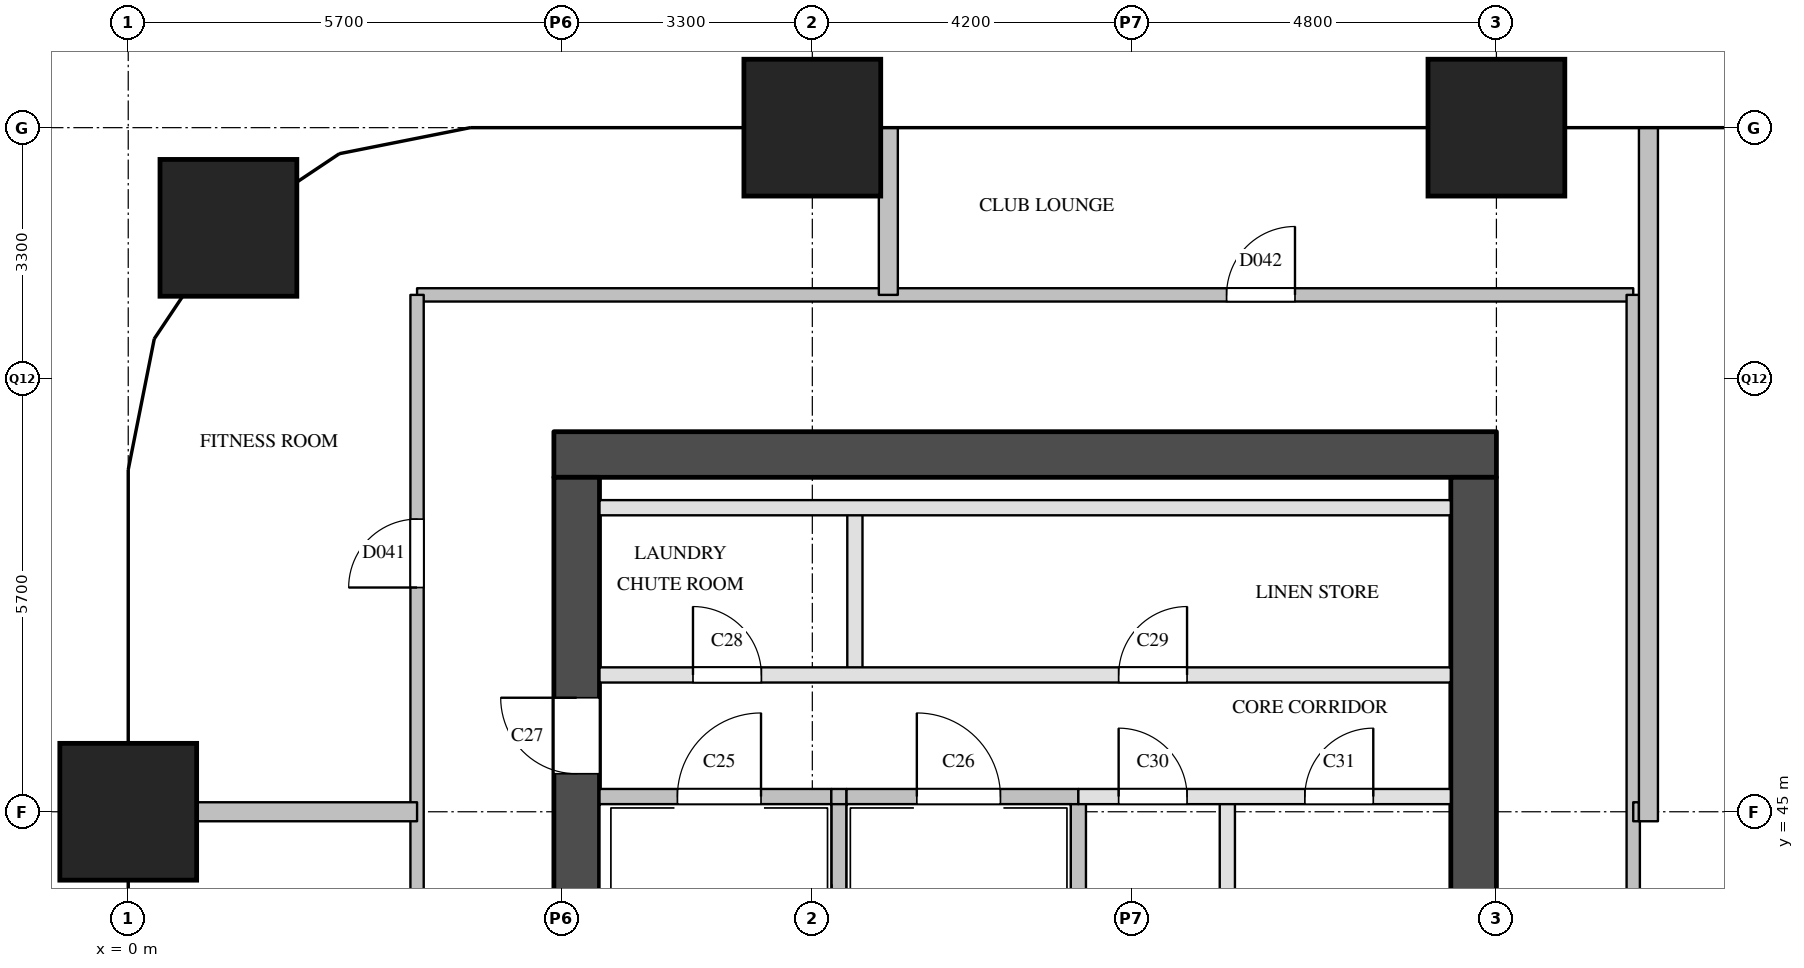
"""IFC4 building model, lengths in metres.
Left out: names, types, materials, properties, quantities, classifications, styles, units other than length and angle.
Written with IfcOpenShell. Run it as: python <this file> out.ifc"""

import sys

from ifc_helpers import new_model, si_unit, direction, frame, frame_2d, origin, origin_2d, place, context, subcontext, project, spatial, rectangle, extrude, element, fill, save


model = new_model("IFC4")
c1 = context("Model", 3, precision=1e-05, world=origin(), true_north=direction((0.0, 1.0)))
c2 = subcontext(c1, "Body", "Model", "MODEL_VIEW")
j1 = project(units=[si_unit("LENGTHUNIT", "METRE"), si_unit("PLANEANGLEUNIT", "RADIAN")], contexts=[c1])
p1 = place(None, origin())
s1 = spatial("IfcSite", under=j1, at=p1, CompositionType="ELEMENT")
p2 = place(p1, origin())
s2 = spatial("IfcBuilding", under=s1, at=p2, CompositionType="ELEMENT")
p3 = place(p2, frame((0.0, 0.0, 72.8)))
s3 = spatial("IfcBuildingStorey", under=s2, at=p3, CompositionType="ELEMENT", Elevation=72.8)
for number, where, z_axis, x_axis in (
    (1, (0.0, 45.0, 0.0), (0.0, 0.0, 1.0), (1.0, 0.0, 0.0)),
    (2, (1.318, 52.682, 0.0), (0.0, 0.0, 1.0), (1.0, 0.0, 0.0)),
    (3, (9.0, 54.0, 0.0), (0.0, 0.0, 1.0), (1.0, 0.0, 0.0)),
    (4, (18.0, 54.0, 0.0), (0.0, 0.0, 1.0), (1.0, 0.0, 0.0)),
):
    element("IfcColumn", number, at=place(p3, frame(where, z_axis=z_axis, x_axis=x_axis)), inside=s3, PredefinedType="COLUMN", context=c2, shape_type="SweptSolid", body=[
        extrude(rectangle(XDim=1.8, YDim=1.8, at=origin_2d()), origin(), (0.0, 0.0, 1.0), 5.0),
    ])
p4 = place(p3, frame((5.6, 49.7, 0.0), z_axis=(0.0, 0.0, 1.0), x_axis=(1.0, 0.0, 0.0)))
e5 = element("IfcWall", 5, at=p4, inside=s3, PredefinedType="SHEAR", context=c2, shape_type="SweptSolid", body=[
    extrude(rectangle(XDim=12.4, YDim=0.6, at=frame_2d((6.2, 0.0))), origin(), (0.0, 0.0, 1.0), 4.7),
])
p5 = place(p3, frame((5.9, 29.1, 0.0), z_axis=(0.0, 0.0, 1.0), x_axis=(0.0, 1.0, 0.0)))
e6 = element("IfcWall", 6, at=p5, inside=s3, PredefinedType="SHEAR", context=c2, shape_type="SweptSolid", body=[
    extrude(rectangle(XDim=20.3, YDim=0.6, at=frame_2d((10.15, 0.0))), origin(), (0.0, 0.0, 1.0), 4.7),
])
p6 = place(p5, frame((3.6, 0.0, 0.0)))
e7 = element("IfcOpeningElement", 7, at=p6, cuts=e6, PredefinedType="OPENING", context=c2, shape_type="SweptSolid", body=[
    extrude(rectangle(XDim=1.8, YDim=2.1, at=frame_2d((0.9, 1.05))), frame((0.0, 0.31, 0.0), z_axis=(0.0, -1.0, 0.0), x_axis=(1.0, 0.0, 0.0)), (0.0, 0.0, 1.0), 0.62),
])
p7 = place(p5, frame((16.4, 0.0, 0.0)))
e8 = element("IfcOpeningElement", 8, at=p7, cuts=e6, PredefinedType="OPENING", context=c2, shape_type="SweptSolid", body=[
    extrude(rectangle(XDim=1.0, YDim=2.1, at=frame_2d((0.5, 1.05))), frame((0.0, 0.31, 0.0), z_axis=(0.0, -1.0, 0.0), x_axis=(1.0, 0.0, 0.0)), (0.0, 0.0, 1.0), 0.62),
])
p8 = place(p3, frame((17.7, 29.1, 0.0), z_axis=(0.0, 0.0, 1.0), x_axis=(0.0, 1.0, 0.0)))
e9 = element("IfcWall", 9, at=p8, inside=s3, PredefinedType="SHEAR", context=c2, shape_type="SweptSolid", body=[
    extrude(rectangle(XDim=20.3, YDim=0.6, at=frame_2d((10.15, 0.0))), origin(), (0.0, 0.0, 1.0), 4.7),
])
p9 = place(p8, frame((1.25, 0.0, 0.0)))
e10 = element("IfcOpeningElement", 10, at=p9, cuts=e9, PredefinedType="OPENING", context=c2, shape_type="SweptSolid", body=[
    extrude(rectangle(XDim=0.7, YDim=2.1, at=frame_2d((0.35, 1.05))), frame((0.0, 0.31, 0.0), z_axis=(0.0, -1.0, 0.0), x_axis=(1.0, 0.0, 0.0)), (0.0, 0.0, 1.0), 0.62),
])
p10 = place(p8, frame((7.05, 0.0, 0.0)))
e11 = element("IfcOpeningElement", 11, at=p10, cuts=e9, PredefinedType="OPENING", context=c2, shape_type="SweptSolid", body=[
    extrude(rectangle(XDim=0.7, YDim=2.1, at=frame_2d((0.35, 1.05))), frame((0.0, 0.31, 0.0), z_axis=(0.0, -1.0, 0.0), x_axis=(1.0, 0.0, 0.0)), (0.0, 0.0, 1.0), 0.62),
])
p11 = place(p3, frame((9.35, 43.7, 0.0), z_axis=(0.0, 0.0, 1.0), x_axis=(0.0, 1.0, 0.0)))
e12 = element("IfcWall", 12, at=p11, inside=s3, PredefinedType="SOLIDWALL", context=c2, shape_type="SweptSolid", body=[
    extrude(rectangle(XDim=1.5, YDim=0.2, at=frame_2d((0.75, 0.0))), origin(), (0.0, 0.0, 1.0), 4.7),
])
p12 = place(p3, frame((9.56, 46.8, 0.0), z_axis=(0.0, 0.0, 1.0), x_axis=(0.0, 1.0, 0.0)))
e13 = element("IfcWall", 13, at=p12, inside=s3, PredefinedType="PARTITIONING", context=c2, shape_type="SweptSolid", body=[
    extrude(rectangle(XDim=2.2, YDim=0.2, at=frame_2d((1.1, 0.0))), origin(), (0.0, 0.0, 1.0), 4.7),
])
p13 = place(p3, frame((12.5, 43.7, 0.0), z_axis=(0.0, 0.0, 1.0), x_axis=(0.0, 1.0, 0.0)))
e14 = element("IfcWall", 14, at=p13, inside=s3, PredefinedType="SOLIDWALL", context=c2, shape_type="SweptSolid", body=[
    extrude(rectangle(XDim=1.5, YDim=0.2, at=frame_2d((0.75, 0.0))), origin(), (0.0, 0.0, 1.0), 4.7),
])
p14 = place(p3, frame((14.46, 39.0, 0.0), z_axis=(0.0, 0.0, 1.0), x_axis=(0.0, 1.0, 0.0)))
e15 = element("IfcWall", 15, at=p14, inside=s3, PredefinedType="PARTITIONING", context=c2, shape_type="SweptSolid", body=[
    extrude(rectangle(XDim=6.2, YDim=0.2, at=frame_2d((3.1, 0.0))), origin(), (0.0, 0.0, 1.0), 4.7),
])
p15 = place(p3, frame((12.5, 45.2, 0.0), z_axis=(0.0, 0.0, 1.0), x_axis=(1.0, 0.0, 0.0)))
e16 = element("IfcWall", 16, at=p15, inside=s3, PredefinedType="PARTITIONING", context=c2, shape_type="SweptSolid", body=[
    extrude(rectangle(XDim=4.9, YDim=0.2, at=frame_2d((2.45, 0.0))), origin(), (0.0, 0.0, 1.0), 4.7),
])
p16 = place(p15, frame((0.53, 0.0, 0.0)))
e17 = element("IfcOpeningElement", 17, at=p16, cuts=e16, PredefinedType="OPENING", context=c2, shape_type="SweptSolid", body=[
    extrude(rectangle(XDim=0.9, YDim=2.1, at=frame_2d((0.45, 1.05))), frame((0.0, 0.11, 0.0), z_axis=(0.0, -1.0, 0.0), x_axis=(1.0, 0.0, 0.0)), (0.0, 0.0, 1.0), 0.22),
])
p17 = place(p15, frame((2.98, 0.0, 0.0)))
e18 = element("IfcOpeningElement", 18, at=p17, cuts=e16, PredefinedType="OPENING", context=c2, shape_type="SweptSolid", body=[
    extrude(rectangle(XDim=0.9, YDim=2.1, at=frame_2d((0.45, 1.05))), frame((0.0, 0.11, 0.0), z_axis=(0.0, -1.0, 0.0), x_axis=(1.0, 0.0, 0.0)), (0.0, 0.0, 1.0), 0.22),
])
p18 = place(p3, frame((6.2, 45.2, 0.0), z_axis=(0.0, 0.0, 1.0), x_axis=(1.0, 0.0, 0.0)))
e19 = element("IfcWall", 19, at=p18, inside=s3, PredefinedType="SOLIDWALL", context=c2, shape_type="SweptSolid", body=[
    extrude(rectangle(XDim=3.05, YDim=0.2, at=frame_2d((1.525, 0.0))), origin(), (0.0, 0.0, 1.0), 4.7),
])
p19 = place(p18, frame((1.025, 0.0, 0.0)))
e20 = element("IfcOpeningElement", 20, at=p19, cuts=e19, PredefinedType="OPENING", context=c2, shape_type="SweptSolid", body=[
    extrude(rectangle(XDim=1.1, YDim=2.1, at=frame_2d((0.55, 1.05))), frame((0.0, 0.11, 0.0), z_axis=(0.0, -1.0, 0.0), x_axis=(1.0, 0.0, 0.0)), (0.0, 0.0, 1.0), 0.22),
])
p20 = place(p3, frame((9.25, 45.2, 0.0), z_axis=(0.0, 0.0, 1.0), x_axis=(1.0, 0.0, 0.0)))
e21 = element("IfcWall", 21, at=p20, inside=s3, PredefinedType="SOLIDWALL", context=c2, shape_type="SweptSolid", body=[
    extrude(rectangle(XDim=0.2, YDim=0.2, at=frame_2d((0.1, 0.0))), origin(), (0.0, 0.0, 1.0), 4.7),
])
p21 = place(p3, frame((9.45, 45.2, 0.0), z_axis=(0.0, 0.0, 1.0), x_axis=(1.0, 0.0, 0.0)))
e22 = element("IfcWall", 22, at=p21, inside=s3, PredefinedType="SOLIDWALL", context=c2, shape_type="SweptSolid", body=[
    extrude(rectangle(XDim=3.05, YDim=0.2, at=frame_2d((1.525, 0.0))), origin(), (0.0, 0.0, 1.0), 4.7),
])
p22 = place(p21, frame((0.925, 0.0, 0.0)))
e23 = element("IfcOpeningElement", 23, at=p22, cuts=e22, PredefinedType="OPENING", context=c2, shape_type="SweptSolid", body=[
    extrude(rectangle(XDim=1.1, YDim=2.1, at=frame_2d((0.55, 1.05))), frame((0.0, 0.11, 0.0), z_axis=(0.0, -1.0, 0.0), x_axis=(1.0, 0.0, 0.0)), (0.0, 0.0, 1.0), 0.22),
])
p23 = place(p3, frame((6.2, 46.8, 0.0), z_axis=(0.0, 0.0, 1.0), x_axis=(1.0, 0.0, 0.0)))
e24 = element("IfcWall", 24, at=p23, inside=s3, PredefinedType="PARTITIONING", context=c2, shape_type="SweptSolid", body=[
    extrude(rectangle(XDim=11.2, YDim=0.2, at=frame_2d((5.6, 0.0))), origin(), (0.0, 0.0, 1.0), 4.7),
])
p24 = place(p23, frame((1.23, 0.0, 0.0)))
e25 = element("IfcOpeningElement", 25, at=p24, cuts=e24, PredefinedType="OPENING", context=c2, shape_type="SweptSolid", body=[
    extrude(rectangle(XDim=0.9, YDim=2.1, at=frame_2d((0.45, 1.05))), frame((0.0, 0.11, 0.0), z_axis=(0.0, -1.0, 0.0), x_axis=(1.0, 0.0, 0.0)), (0.0, 0.0, 1.0), 0.22),
])
p25 = place(p23, frame((6.83, 0.0, 0.0)))
e26 = element("IfcOpeningElement", 26, at=p25, cuts=e24, PredefinedType="OPENING", context=c2, shape_type="SweptSolid", body=[
    extrude(rectangle(XDim=0.9, YDim=2.1, at=frame_2d((0.45, 1.05))), frame((0.0, 0.11, 0.0), z_axis=(0.0, -1.0, 0.0), x_axis=(1.0, 0.0, 0.0)), (0.0, 0.0, 1.0), 0.22),
])
p26 = place(p3, frame((6.2, 49.0, 0.0), z_axis=(0.0, 0.0, 1.0), x_axis=(1.0, 0.0, 0.0)))
e27 = element("IfcWall", 27, at=p26, inside=s3, PredefinedType="PARTITIONING", context=c2, shape_type="SweptSolid", body=[
    extrude(rectangle(XDim=11.2, YDim=0.2, at=frame_2d((5.6, 0.0))), origin(), (0.0, 0.0, 1.0), 4.7),
])
p27 = place(p3, frame((3.8, 51.8, 0.0), z_axis=(0.0, 0.0, 1.0), x_axis=(1.0, 0.0, 0.0)))
e28 = element("IfcWall", 28, at=p27, inside=s3, PredefinedType="PARTITIONING", context=c2, shape_type="SweptSolid", body=[
    extrude(rectangle(XDim=16.0, YDim=0.175, at=frame_2d((8.0, 0.0))), origin(), (0.0, 0.0, 1.0), 4.7),
])
p28 = place(p27, frame((10.65, 0.0, 0.0)))
e29 = element("IfcOpeningElement", 29, at=p28, cuts=e28, PredefinedType="OPENING", context=c2, shape_type="SweptSolid", body=[
    extrude(rectangle(XDim=0.9, YDim=2.1, at=frame_2d((0.45, 1.05))), frame((0.0, 0.097, 0.0), z_axis=(0.0, -1.0, 0.0), x_axis=(1.0, 0.0, 0.0)), (0.0, 0.0, 1.0), 0.195),
])
p29 = place(p3, frame((3.8, 26.7, 0.0), z_axis=(0.0, 0.0, 1.0), x_axis=(0.0, 1.0, 0.0)))
e30 = element("IfcWall", 30, at=p29, inside=s3, PredefinedType="PARTITIONING", context=c2, shape_type="SweptSolid", body=[
    extrude(rectangle(XDim=25.1, YDim=0.175, at=frame_2d((12.55, 0.0))), origin(), (0.0, 0.0, 1.0), 3.59),
])
p30 = place(p29, frame((3.7, 0.0, 0.0)))
e31 = element("IfcOpeningElement", 31, at=p30, cuts=e30, PredefinedType="OPENING", context=c2, shape_type="SweptSolid", body=[
    extrude(rectangle(XDim=0.9, YDim=2.1, at=frame_2d((0.45, 1.05))), frame((0.0, 0.097, 0.0), z_axis=(0.0, -1.0, 0.0), x_axis=(1.0, 0.0, 0.0)), (0.0, 0.0, 1.0), 0.195),
])
p31 = place(p29, frame((12.85, 0.0, 0.0)))
e32 = element("IfcOpeningElement", 32, at=p31, cuts=e30, PredefinedType="OPENING", context=c2, shape_type="SweptSolid", body=[
    extrude(rectangle(XDim=0.9, YDim=2.1, at=frame_2d((0.45, 1.05))), frame((0.0, 0.097, 0.0), z_axis=(0.0, -1.0, 0.0), x_axis=(1.0, 0.0, 0.0)), (0.0, 0.0, 1.0), 0.195),
])
p32 = place(p29, frame((21.25, 0.0, 0.0)))
e33 = element("IfcOpeningElement", 33, at=p32, cuts=e30, PredefinedType="OPENING", context=c2, shape_type="SweptSolid", body=[
    extrude(rectangle(XDim=0.9, YDim=2.1, at=frame_2d((0.45, 1.05))), frame((0.0, 0.097, 0.0), z_axis=(0.0, -1.0, 0.0), x_axis=(1.0, 0.0, 0.0)), (0.0, 0.0, 1.0), 0.195),
])
p33 = place(p3, frame((19.8, 29.12, 0.0), z_axis=(0.0, 0.0, 1.0), x_axis=(0.0, 1.0, 0.0)))
e34 = element("IfcWall", 34, at=p33, inside=s3, PredefinedType="PARTITIONING", context=c2, shape_type="SweptSolid", body=[
    extrude(rectangle(XDim=22.68, YDim=0.175, at=frame_2d((11.34, 0.0))), origin(), (0.0, 0.0, 1.0), 4.7),
])
p34 = place(p33, frame((7.49, 0.0, 0.0)))
e35 = element("IfcOpeningElement", 35, at=p34, cuts=e34, PredefinedType="OPENING", context=c2, shape_type="SweptSolid", body=[
    extrude(rectangle(XDim=0.9, YDim=2.1, at=frame_2d((0.45, 1.05))), frame((0.0, 0.097, 0.0), z_axis=(0.0, -1.0, 0.0), x_axis=(1.0, 0.0, 0.0)), (0.0, 0.0, 1.0), 0.195),
])
p35 = place(p3, frame((0.0, 45.0, 0.0), z_axis=(0.0, 0.0, 1.0), x_axis=(1.0, 0.0, 0.0)))
e36 = element("IfcWall", 36, at=p35, inside=s3, PredefinedType="PARTITIONING", context=c2, shape_type="SweptSolid", body=[
    extrude(rectangle(XDim=3.8, YDim=0.25, at=frame_2d((1.9, 0.0))), origin(), (0.0, 0.0, 1.0), 4.7),
])
p36 = place(p3, frame((19.8, 45.0, 0.0), z_axis=(0.0, 0.0, 1.0), x_axis=(1.0, 0.0, 0.0)))
e37 = element("IfcWall", 37, at=p36, inside=s3, PredefinedType="PARTITIONING", context=c2, shape_type="SweptSolid", body=[
    extrude(rectangle(XDim=0.075, YDim=0.25, at=frame_2d((0.038, 0.0))), origin(), (0.0, 0.0, 1.0), 4.7),
])
p37 = place(p3, frame((10.0, 51.8, 0.0), z_axis=(0.0, 0.0, 1.0), x_axis=(0.0, 1.0, 0.0)))
e38 = element("IfcWall", 38, at=p37, inside=s3, PredefinedType="PARTITIONING", context=c2, shape_type="SweptSolid", body=[
    extrude(rectangle(XDim=2.2, YDim=0.25, at=frame_2d((1.1, 0.0))), origin(), (0.0, 0.0, 1.0), 3.7),
])
p38 = place(p3, frame((20.0, 44.875, 0.0), z_axis=(0.0, 0.0, 1.0), x_axis=(0.0, 1.0, 0.0)))
e39 = element("IfcWall", 39, at=p38, inside=s3, PredefinedType="PARTITIONING", context=c2, shape_type="SweptSolid", body=[
    extrude(rectangle(XDim=9.125, YDim=0.25, at=frame_2d((4.562, 0.0))), origin(), (0.0, 0.0, 1.0), 3.7),
])
p39 = place(p19, origin())
e40 = element("IfcDoor", 40, at=p39, inside=s3, OperationType="SINGLE_SWING_RIGHT", PredefinedType="DOOR", context=c2, shape_type="SweptSolid", body=[
    extrude(rectangle(XDim=1.1, YDim=2.1, at=frame_2d((0.55, 1.05))), frame((0.0, 0.025, 0.0), z_axis=(0.0, -1.0, 0.0), x_axis=(1.0, 0.0, 0.0)), (0.0, 0.0, 1.0), 0.05),
])
fill(e20, e40)
p40 = place(p22, origin())
e41 = element("IfcDoor", 41, at=p40, inside=s3, OperationType="SINGLE_SWING_LEFT", PredefinedType="DOOR", context=c2, shape_type="SweptSolid", body=[
    extrude(rectangle(XDim=1.1, YDim=2.1, at=frame_2d((0.55, 1.05))), frame((0.0, 0.025, 0.0), z_axis=(0.0, -1.0, 0.0), x_axis=(1.0, 0.0, 0.0)), (0.0, 0.0, 1.0), 0.05),
])
fill(e23, e41)
p41 = place(p7, origin())
e42 = element("IfcDoor", 42, at=p41, inside=s3, OperationType="SINGLE_SWING_RIGHT", PredefinedType="DOOR", context=c2, shape_type="SweptSolid", body=[
    extrude(rectangle(XDim=1.0, YDim=2.1, at=frame_2d((0.5, 1.05))), frame((0.0, 0.025, 0.0), z_axis=(0.0, -1.0, 0.0), x_axis=(1.0, 0.0, 0.0)), (0.0, 0.0, 1.0), 0.05),
])
fill(e8, e42)
p42 = place(p24, origin())
e43 = element("IfcDoor", 43, at=p42, inside=s3, OperationType="SINGLE_SWING_LEFT", PredefinedType="DOOR", context=c2, shape_type="SweptSolid", body=[
    extrude(rectangle(XDim=0.9, YDim=2.1, at=frame_2d((0.45, 1.05))), frame((0.0, 0.025, 0.0), z_axis=(0.0, -1.0, 0.0), x_axis=(1.0, 0.0, 0.0)), (0.0, 0.0, 1.0), 0.05),
])
fill(e25, e43)
p43 = place(p25, origin())
e44 = element("IfcDoor", 44, at=p43, inside=s3, OperationType="SINGLE_SWING_RIGHT", PredefinedType="DOOR", context=c2, shape_type="SweptSolid", body=[
    extrude(rectangle(XDim=0.9, YDim=2.1, at=frame_2d((0.45, 1.05))), frame((0.0, 0.025, 0.0), z_axis=(0.0, -1.0, 0.0), x_axis=(1.0, 0.0, 0.0)), (0.0, 0.0, 1.0), 0.05),
])
fill(e26, e44)
p44 = place(p16, origin())
e45 = element("IfcDoor", 45, at=p44, inside=s3, OperationType="SINGLE_SWING_LEFT", PredefinedType="DOOR", context=c2, shape_type="SweptSolid", body=[
    extrude(rectangle(XDim=0.9, YDim=2.1, at=frame_2d((0.45, 1.05))), frame((0.0, 0.025, 0.0), z_axis=(0.0, -1.0, 0.0), x_axis=(1.0, 0.0, 0.0)), (0.0, 0.0, 1.0), 0.05),
])
fill(e17, e45)
p45 = place(p17, origin())
e46 = element("IfcDoor", 46, at=p45, inside=s3, OperationType="SINGLE_SWING_RIGHT", PredefinedType="DOOR", context=c2, shape_type="SweptSolid", body=[
    extrude(rectangle(XDim=0.9, YDim=2.1, at=frame_2d((0.45, 1.05))), frame((0.0, 0.025, 0.0), z_axis=(0.0, -1.0, 0.0), x_axis=(1.0, 0.0, 0.0)), (0.0, 0.0, 1.0), 0.05),
])
fill(e18, e46)
p46 = place(p32, origin())
e47 = element("IfcDoor", 47, at=p46, inside=s3, OperationType="SINGLE_SWING_LEFT", PredefinedType="DOOR", context=c2, shape_type="SweptSolid", body=[
    extrude(rectangle(XDim=0.9, YDim=2.1, at=frame_2d((0.45, 1.05))), frame((0.0, 0.025, 0.0), z_axis=(0.0, -1.0, 0.0), x_axis=(1.0, 0.0, 0.0)), (0.0, 0.0, 1.0), 0.05),
])
fill(e33, e47)
p47 = place(p28, origin())
e48 = element("IfcDoor", 48, at=p47, inside=s3, OperationType="SINGLE_SWING_RIGHT", PredefinedType="DOOR", context=c2, shape_type="SweptSolid", body=[
    extrude(rectangle(XDim=0.9, YDim=2.1, at=frame_2d((0.45, 1.05))), frame((0.0, 0.025, 0.0), z_axis=(0.0, -1.0, 0.0), x_axis=(1.0, 0.0, 0.0)), (0.0, 0.0, 1.0), 0.05),
])
fill(e29, e48)
save(model, sys.argv[1])
